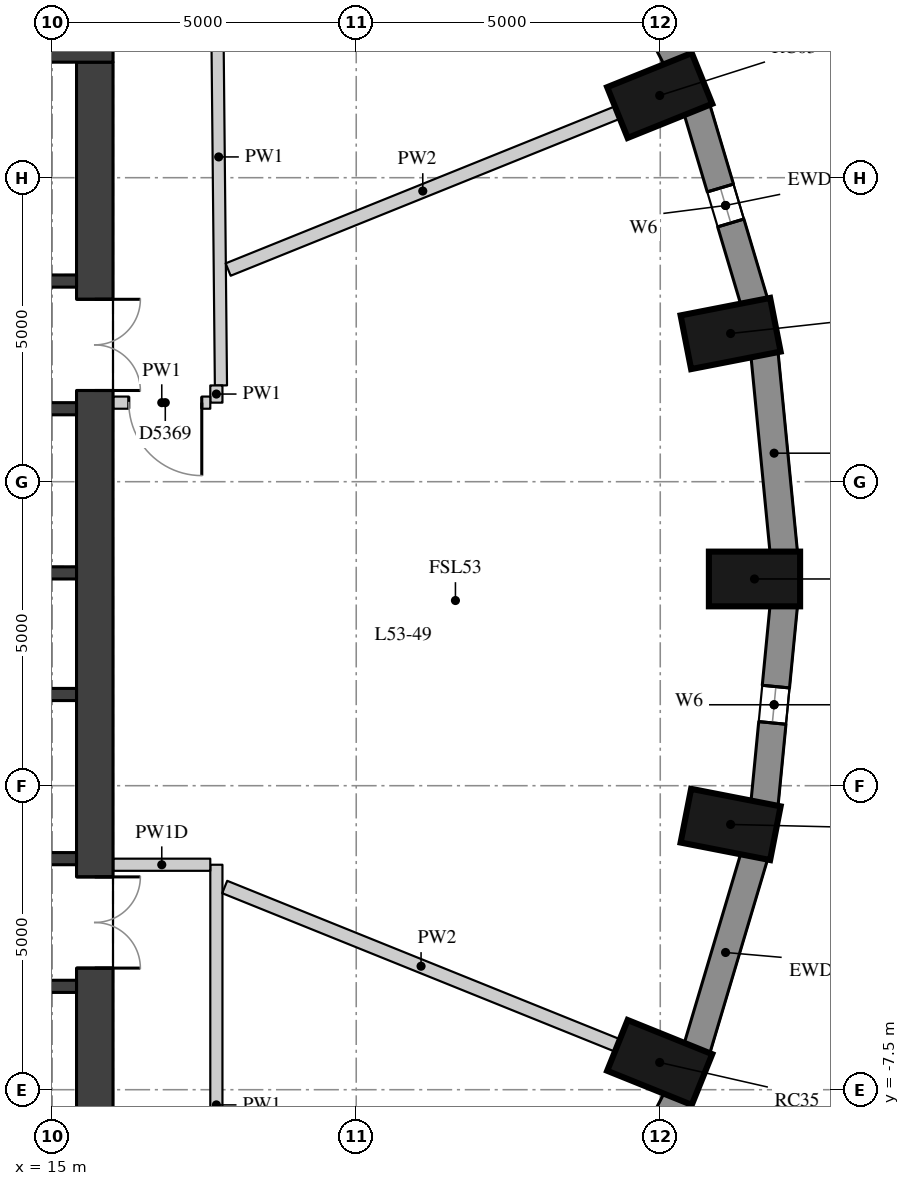
"""IFC4 building model, lengths in metres.
Left out: names, types, materials, properties, quantities, classifications, styles, units other than length and angle.
Written with IfcOpenShell. Run it as: python <this file> out.ifc"""

import sys

from ifc_helpers import new_model, si_unit, direction, frame, frame_2d, origin, origin_2d, place, context, subcontext, project, spatial, rectangle, extrude, element, fill, save


model = new_model("IFC4")
c1 = context("Model", 3, precision=1e-05, world=origin(), true_north=direction((0.0, 1.0)))
c2 = subcontext(c1, "Body", "Model", "MODEL_VIEW")
j1 = project(units=[si_unit("LENGTHUNIT", "METRE"), si_unit("PLANEANGLEUNIT", "RADIAN")], contexts=[c1])
p1 = place(None, origin())
s1 = spatial("IfcSite", under=j1, at=p1, CompositionType="ELEMENT")
p2 = place(p1, origin())
s2 = spatial("IfcBuilding", under=s1, at=p2, CompositionType="ELEMENT")
p3 = place(p2, frame((0.0, 0.0, 189.2)))
s3 = spatial("IfcBuildingStorey", under=s2, at=p3, CompositionType="ELEMENT", Elevation=189.2)
for number, where, z_axis, x_axis in (
    (1, (26.55, 0.9, 0.0), (0.0, 0.0, 1.0), (1.0, 0.0, 0.0)),
    (2, (26.157, 4.937, 0.0), (0.0, 0.0, 1.0), (0.981, 0.192, 0.0)),
    (3, (24.991, 8.852, 0.0), (0.0, 0.0, 1.0), (0.927, 0.374, 0.0)),
    (4, (24.991, -7.052, 0.0), (0.0, 0.0, 1.0), (0.927, -0.374, 0.0)),
    (5, (26.157, -3.137, 0.0), (0.0, 0.0, 1.0), (0.981, -0.192, 0.0)),
):
    element("IfcColumn", number, at=place(p3, frame(where, z_axis=z_axis, x_axis=x_axis)), inside=s3, PredefinedType="COLUMN", context=c2, shape_type="SweptSolid", body=[
        extrude(rectangle(XDim=1.5, YDim=0.9, at=origin_2d()), origin(), (0.0, 0.0, 1.0), 3.3),
    ])
p4 = place(p3, frame((27.032, 1.33, 0.0), z_axis=(0.0, 0.0, 1.0), x_axis=(-0.096824116835, 0.995301507283, 0.0)))
e6 = element("IfcWall", 6, at=p4, inside=s3, PredefinedType="SOLIDWALL", context=c2, shape_type="SweptSolid", body=[
    extrude(rectangle(XDim=3.293, YDim=0.45, at=frame_2d((1.646, 0.0))), origin(), (0.0, 0.0, 1.0), 3.02),
])
p5 = place(p3, frame((26.548, 5.452, 0.0), z_axis=(0.0, 0.0, 1.0), x_axis=(-0.285444972963, 0.958395099847, 0.0)))
e7 = element("IfcWall", 7, at=p5, inside=s3, PredefinedType="SOLIDWALL", context=c2, shape_type="SweptSolid", body=[
    extrude(rectangle(XDim=3.32, YDim=0.45, at=frame_2d((1.66, 0.0))), origin(), (0.0, 0.0, 1.0), 3.02),
])
p6 = place(p5, frame((1.36, 0.0, 0.4)))
e8 = element("IfcOpeningElement", 8, at=p6, cuts=e7, PredefinedType="OPENING", context=c2, shape_type="SweptSolid", body=[
    extrude(rectangle(XDim=0.6, YDim=1.75, at=frame_2d((0.3, 0.875))), frame((0.0, 0.235, 0.0), z_axis=(0.0, -1.0, 0.0), x_axis=(1.0, 0.0, 0.0)), (0.0, 0.0, 1.0), 0.47),
])
p7 = place(p3, frame((25.278, 9.432, 0.0), z_axis=(0.0, 0.0, 1.0), x_axis=(-0.460175500475, 0.887827972505, 0.0)))
e9 = element("IfcWall", 9, at=p7, inside=s3, PredefinedType="SOLIDWALL", context=c2, shape_type="SweptSolid", body=[
    extrude(rectangle(XDim=3.371, YDim=0.45, at=frame_2d((1.685, 0.0))), origin(), (0.0, 0.0, 1.0), 3.02),
])
p8 = place(p3, frame((23.727, -10.624, 0.0), z_axis=(0.0, 0.0, 1.0), x_axis=(0.460175500475, 0.887827972505, 0.0)))
e10 = element("IfcWall", 10, at=p8, inside=s3, PredefinedType="SOLIDWALL", context=c2, shape_type="SweptSolid", body=[
    extrude(rectangle(XDim=3.371, YDim=0.45, at=frame_2d((1.685, 0.0))), origin(), (0.0, 0.0, 1.0), 3.02),
])
p9 = place(p8, frame((1.385, 0.0, 0.4)))
e11 = element("IfcOpeningElement", 11, at=p9, cuts=e10, PredefinedType="OPENING", context=c2, shape_type="SweptSolid", body=[
    extrude(rectangle(XDim=0.6, YDim=1.75, at=frame_2d((0.3, 0.875))), frame((0.0, 0.235, 0.0), z_axis=(0.0, -1.0, 0.0), x_axis=(1.0, 0.0, 0.0)), (0.0, 0.0, 1.0), 0.47),
])
p10 = place(p3, frame((25.6, -6.834, 0.0), z_axis=(0.0, 0.0, 1.0), x_axis=(0.285444972963, 0.958395099847, 0.0)))
e12 = element("IfcWall", 12, at=p10, inside=s3, PredefinedType="SOLIDWALL", context=c2, shape_type="SweptSolid", body=[
    extrude(rectangle(XDim=3.32, YDim=0.45, at=frame_2d((1.66, 0.0))), origin(), (0.0, 0.0, 1.0), 3.02),
])
p11 = place(p3, frame((26.713, -2.808, 0.0), z_axis=(0.0, 0.0, 1.0), x_axis=(0.096816972749, 0.995302202242, 0.0)))
e13 = element("IfcWall", 13, at=p11, inside=s3, PredefinedType="SOLIDWALL", context=c2, shape_type="SweptSolid", body=[
    extrude(rectangle(XDim=3.293, YDim=0.45, at=frame_2d((1.646, 0.0))), origin(), (0.0, 0.0, 1.0), 3.02),
])
p12 = place(p11, frame((1.347, 0.0, 0.4)))
e14 = element("IfcOpeningElement", 14, at=p12, cuts=e13, PredefinedType="OPENING", context=c2, shape_type="SweptSolid", body=[
    extrude(rectangle(XDim=0.6, YDim=1.75, at=frame_2d((0.3, 0.875))), frame((0.0, 0.235, 0.0), z_axis=(0.0, -1.0, 0.0), x_axis=(1.0, 0.0, 0.0)), (0.0, 0.0, 1.0), 0.47),
])
p13 = place(p3, frame((15.7, -9.4, 0.0), z_axis=(0.0, 0.0, 1.0), x_axis=(0.0, 1.0, 0.0)))
e15 = element("IfcWall", 15, at=p13, inside=s3, PredefinedType="SHEAR", context=c2, shape_type="SweptSolid", body=[
    extrude(rectangle(XDim=18.8, YDim=0.6, at=frame_2d((9.4, 0.0))), origin(), (0.0, 0.0, 1.0), 3.02),
])
p14 = place(p13, frame((13.4, 0.0, 0.0)))
e16 = element("IfcOpeningElement", 16, at=p14, cuts=e15, PredefinedType="OPENING", context=c2, shape_type="SweptSolid", body=[
    extrude(rectangle(XDim=1.5, YDim=2.1, at=frame_2d((0.75, 1.05))), frame((0.0, 0.31, 0.0), z_axis=(0.0, -1.0, 0.0), x_axis=(1.0, 0.0, 0.0)), (0.0, 0.0, 1.0), 0.62),
])
p15 = place(p13, frame((3.9, 0.0, 0.0)))
e17 = element("IfcOpeningElement", 17, at=p15, cuts=e15, PredefinedType="OPENING", context=c2, shape_type="SweptSolid", body=[
    extrude(rectangle(XDim=1.5, YDim=2.1, at=frame_2d((0.75, 1.05))), frame((0.0, 0.31, 0.0), z_axis=(0.0, -1.0, 0.0), x_axis=(1.0, 0.0, 0.0)), (0.0, 0.0, 1.0), 0.62),
])
p16 = place(p3, frame((4.0, 9.7, 0.0), z_axis=(0.0, 0.0, 1.0), x_axis=(1.0, 0.0, 0.0)))
e18 = element("IfcWall", 18, at=p16, inside=s3, PredefinedType="SHEAR", context=c2, shape_type="SweptSolid", body=[
    extrude(rectangle(XDim=12.0, YDim=0.6, at=frame_2d((6.0, 0.0))), origin(), (0.0, 0.0, 1.0), 3.02),
])
p17 = place(p3, frame((4.6, 5.8, 0.0), z_axis=(0.0, 0.0, 1.0), x_axis=(1.0, 0.0, 0.0)))
e19 = element("IfcWall", 19, at=p17, inside=s3, PredefinedType="SHEAR", context=c2, shape_type="SweptSolid", body=[
    extrude(rectangle(XDim=10.8, YDim=0.2, at=frame_2d((5.4, 0.0))), origin(), (0.0, 0.0, 1.0), 3.02),
])
p18 = place(p17, frame((7.05, 0.0, 0.0)))
e20 = element("IfcOpeningElement", 20, at=p18, cuts=e19, PredefinedType="OPENING", context=c2, shape_type="SweptSolid", body=[
    extrude(rectangle(XDim=1.1, YDim=2.1, at=frame_2d((0.55, 1.05))), frame((0.0, 0.11, 0.0), z_axis=(0.0, -1.0, 0.0), x_axis=(1.0, 0.0, 0.0)), (0.0, 0.0, 1.0), 0.22),
])
p19 = place(p17, frame((9.05, 0.0, 0.0)))
e21 = element("IfcOpeningElement", 21, at=p19, cuts=e19, PredefinedType="OPENING", context=c2, shape_type="SweptSolid", body=[
    extrude(rectangle(XDim=1.1, YDim=2.1, at=frame_2d((0.55, 1.05))), frame((0.0, 0.11, 0.0), z_axis=(0.0, -1.0, 0.0), x_axis=(1.0, 0.0, 0.0)), (0.0, 0.0, 1.0), 0.22),
])
p20 = place(p3, frame((4.6, 3.7, 0.0), z_axis=(0.0, 0.0, 1.0), x_axis=(1.0, 0.0, 0.0)))
e22 = element("IfcWall", 22, at=p20, inside=s3, PredefinedType="SHEAR", context=c2, shape_type="SweptSolid", body=[
    extrude(rectangle(XDim=10.8, YDim=0.2, at=frame_2d((5.4, 0.0))), origin(), (0.0, 0.0, 1.0), 3.02),
])
p21 = place(p20, frame((6.6, 0.0, 0.0)))
e23 = element("IfcOpeningElement", 23, at=p21, cuts=e22, PredefinedType="OPENING", context=c2, shape_type="SweptSolid", body=[
    extrude(rectangle(XDim=1.1, YDim=2.1, at=frame_2d((0.55, 1.05))), frame((0.0, 0.11, 0.0), z_axis=(0.0, -1.0, 0.0), x_axis=(1.0, 0.0, 0.0)), (0.0, 0.0, 1.0), 0.22),
])
p22 = place(p20, frame((8.9, 0.0, 0.0)))
e24 = element("IfcOpeningElement", 24, at=p22, cuts=e22, PredefinedType="OPENING", context=c2, shape_type="SweptSolid", body=[
    extrude(rectangle(XDim=1.1, YDim=2.1, at=frame_2d((0.55, 1.05))), frame((0.0, 0.11, 0.0), z_axis=(0.0, -1.0, 0.0), x_axis=(1.0, 0.0, 0.0)), (0.0, 0.0, 1.0), 0.22),
])
for number, where, z_axis, x_axis in (
    (25, (4.6, 1.0, 0.0), (0.0, 0.0, 1.0), (1.0, 0.0, 0.0)),
    (26, (4.6, -1.0, 0.0), (0.0, 0.0, 1.0), (1.0, 0.0, 0.0)),
):
    element("IfcWall", number, at=place(p3, frame(where, z_axis=z_axis, x_axis=x_axis)), inside=s3, PredefinedType="SHEAR", context=c2, shape_type="SweptSolid", body=[
        extrude(rectangle(XDim=10.8, YDim=0.2, at=frame_2d((5.4, 0.0))), origin(), (0.0, 0.0, 1.0), 3.02),
    ])
p23 = place(p3, frame((4.6, -3.7, 0.0), z_axis=(0.0, 0.0, 1.0), x_axis=(1.0, 0.0, 0.0)))
e27 = element("IfcWall", 27, at=p23, inside=s3, PredefinedType="SHEAR", context=c2, shape_type="SweptSolid", body=[
    extrude(rectangle(XDim=10.8, YDim=0.2, at=frame_2d((5.4, 0.0))), origin(), (0.0, 0.0, 1.0), 3.02),
])
p24 = place(p23, frame((6.6, 0.0, 0.0)))
e28 = element("IfcOpeningElement", 28, at=p24, cuts=e27, PredefinedType="OPENING", context=c2, shape_type="SweptSolid", body=[
    extrude(rectangle(XDim=1.1, YDim=2.1, at=frame_2d((0.55, 1.05))), frame((0.0, 0.11, 0.0), z_axis=(0.0, -1.0, 0.0), x_axis=(1.0, 0.0, 0.0)), (0.0, 0.0, 1.0), 0.22),
])
p25 = place(p23, frame((8.9, 0.0, 0.0)))
e29 = element("IfcOpeningElement", 29, at=p25, cuts=e27, PredefinedType="OPENING", context=c2, shape_type="SweptSolid", body=[
    extrude(rectangle(XDim=1.1, YDim=2.1, at=frame_2d((0.55, 1.05))), frame((0.0, 0.11, 0.0), z_axis=(0.0, -1.0, 0.0), x_axis=(1.0, 0.0, 0.0)), (0.0, 0.0, 1.0), 0.22),
])
p26 = place(p3, frame((4.6, -5.8, 0.0), z_axis=(0.0, 0.0, 1.0), x_axis=(1.0, 0.0, 0.0)))
e30 = element("IfcWall", 30, at=p26, inside=s3, PredefinedType="SHEAR", context=c2, shape_type="SweptSolid", body=[
    extrude(rectangle(XDim=10.8, YDim=0.2, at=frame_2d((5.4, 0.0))), origin(), (0.0, 0.0, 1.0), 3.02),
])
p27 = place(p3, frame((17.7, -3.8, 0.0), z_axis=(0.0, 0.0, 1.0), x_axis=(0.0, -1.0, 0.0)))
e31 = element("IfcWall", 31, at=p27, inside=s3, PredefinedType="PARTITIONING", context=c2, shape_type="SweptSolid", body=[
    extrude(rectangle(XDim=7.9, YDim=0.2, at=frame_2d((3.95, 0.0))), origin(), (0.0, 0.0, 1.0), 3.02),
])
p28 = place(p3, frame((17.701, 11.6, 0.0), z_axis=(0.0, 0.0, 1.0), x_axis=(0.009840700525, -0.999951579134, 0.0)))
e32 = element("IfcWall", 32, at=p28, inside=s3, PredefinedType="PARTITIONING", context=c2, shape_type="SweptSolid", body=[
    extrude(rectangle(XDim=7.517, YDim=0.2, at=frame_2d((3.759, 0.0))), origin(), (0.0, 0.0, 1.0), 3.02),
])
p29 = place(p3, frame((17.7, 4.083, 0.0), z_axis=(0.0, 0.0, 1.0), x_axis=(0.0, -1.0, 0.0)))
e33 = element("IfcWall", 33, at=p29, inside=s3, PredefinedType="PARTITIONING", context=c2, shape_type="SweptSolid", body=[
    extrude(rectangle(XDim=0.283, YDim=0.2, at=frame_2d((0.142, 0.0))), origin(), (0.0, 0.0, 1.0), 3.02),
])
p30 = place(p3, frame((17.6, 3.8, 0.0), z_axis=(0.0, 0.0, 1.0), x_axis=(-1.0, 0.0, 0.0)))
e34 = element("IfcWall", 34, at=p30, inside=s3, PredefinedType="PARTITIONING", context=c2, shape_type="SweptSolid", body=[
    extrude(rectangle(XDim=1.596, YDim=0.2, at=frame_2d((0.798, 0.0))), origin(), (0.0, 0.0, 1.0), 3.02),
])
p31 = place(p30, frame((0.14, 0.0, 0.0)))
e35 = element("IfcOpeningElement", 35, at=p31, cuts=e34, PredefinedType="OPENING", context=c2, shape_type="SweptSolid", body=[
    extrude(rectangle(XDim=1.2, YDim=2.1, at=frame_2d((0.6, 1.05))), frame((0.0, 0.11, 0.0), z_axis=(0.0, -1.0, 0.0), x_axis=(1.0, 0.0, 0.0)), (0.0, 0.0, 1.0), 0.22),
])
p32 = place(p3, frame((16.004, -3.8, 0.0), z_axis=(0.0, 0.0, 1.0), x_axis=(1.0, 0.0, 0.0)))
e36 = element("IfcWall", 36, at=p32, inside=s3, PredefinedType="PARTITIONING", context=c2, shape_type="SweptSolid", body=[
    extrude(rectangle(XDim=1.596, YDim=0.2, at=frame_2d((0.798, 0.0))), origin(), (0.0, 0.0, 1.0), 2.47),
])
p33 = place(p3, frame((24.295, 8.571, 0.0), z_axis=(0.0, 0.0, 1.0), x_axis=(-0.927397147779, -0.374078240869, 0.0)))
e37 = element("IfcWall", 37, at=p33, inside=s3, PredefinedType="PARTITIONING", context=c2, shape_type="SweptSolid", body=[
    extrude(rectangle(XDim=6.903, YDim=0.22, at=frame_2d((3.452, 0.0))), origin(), (0.0, 0.0, 1.0), 3.02),
])
p34 = place(p3, frame((24.295, -6.771, 0.0), z_axis=(0.0, 0.0, 1.0), x_axis=(-0.927387137769, 0.374103056256, 0.0)))
e38 = element("IfcWall", 38, at=p34, inside=s3, PredefinedType="PARTITIONING", context=c2, shape_type="SweptSolid", body=[
    extrude(rectangle(XDim=6.964, YDim=0.22, at=frame_2d((3.482, 0.0))), origin(), (0.0, 0.0, 1.0), 3.02),
])
p35 = place(p6, origin())
e39 = element("IfcWindow", 39, at=p35, inside=s3, PartitioningType="SINGLE_PANEL", PredefinedType="WINDOW", context=c2, shape_type="SweptSolid", body=[
    extrude(rectangle(XDim=0.6, YDim=1.75, at=frame_2d((0.3, 0.875))), frame((0.0, 0.035, 0.0), z_axis=(0.0, -1.0, 0.0), x_axis=(1.0, 0.0, 0.0)), (0.0, 0.0, 1.0), 0.06),
])
fill(e8, e39)
p36 = place(p12, origin())
e40 = element("IfcWindow", 40, at=p36, inside=s3, PartitioningType="SINGLE_PANEL", PredefinedType="WINDOW", context=c2, shape_type="SweptSolid", body=[
    extrude(rectangle(XDim=0.6, YDim=1.75, at=frame_2d((0.3, 0.875))), frame((0.0, 0.035, 0.0), z_axis=(0.0, -1.0, 0.0), x_axis=(1.0, 0.0, 0.0)), (0.0, 0.0, 1.0), 0.06),
])
fill(e14, e40)
p37 = place(p14, origin())
e41 = element("IfcDoor", 41, at=p37, inside=s3, OperationType="DOUBLE_DOOR_SINGLE_SWING", PredefinedType="DOOR", context=c2, shape_type="SweptSolid", body=[
    extrude(rectangle(XDim=1.5, YDim=2.1, at=frame_2d((0.75, 1.05))), frame((0.0, 0.025, 0.0), z_axis=(0.0, -1.0, 0.0), x_axis=(1.0, 0.0, 0.0)), (0.0, 0.0, 1.0), 0.05),
])
fill(e16, e41)
p38 = place(p15, origin())
e42 = element("IfcDoor", 42, at=p38, inside=s3, OperationType="DOUBLE_DOOR_SINGLE_SWING", PredefinedType="DOOR", context=c2, shape_type="SweptSolid", body=[
    extrude(rectangle(XDim=1.5, YDim=2.1, at=frame_2d((0.75, 1.05))), frame((0.0, 0.025, 0.0), z_axis=(0.0, -1.0, 0.0), x_axis=(1.0, 0.0, 0.0)), (0.0, 0.0, 1.0), 0.05),
])
fill(e17, e42)
p39 = place(p31, origin())
e43 = element("IfcDoor", 43, at=p39, inside=s3, OperationType="SINGLE_SWING_LEFT", PredefinedType="DOOR", context=c2, shape_type="SweptSolid", body=[
    extrude(rectangle(XDim=1.2, YDim=2.1, at=frame_2d((0.6, 1.05))), frame((0.0, 0.025, 0.0), z_axis=(0.0, -1.0, 0.0), x_axis=(1.0, 0.0, 0.0)), (0.0, 0.0, 1.0), 0.05),
])
fill(e35, e43)
save(model, sys.argv[1])
